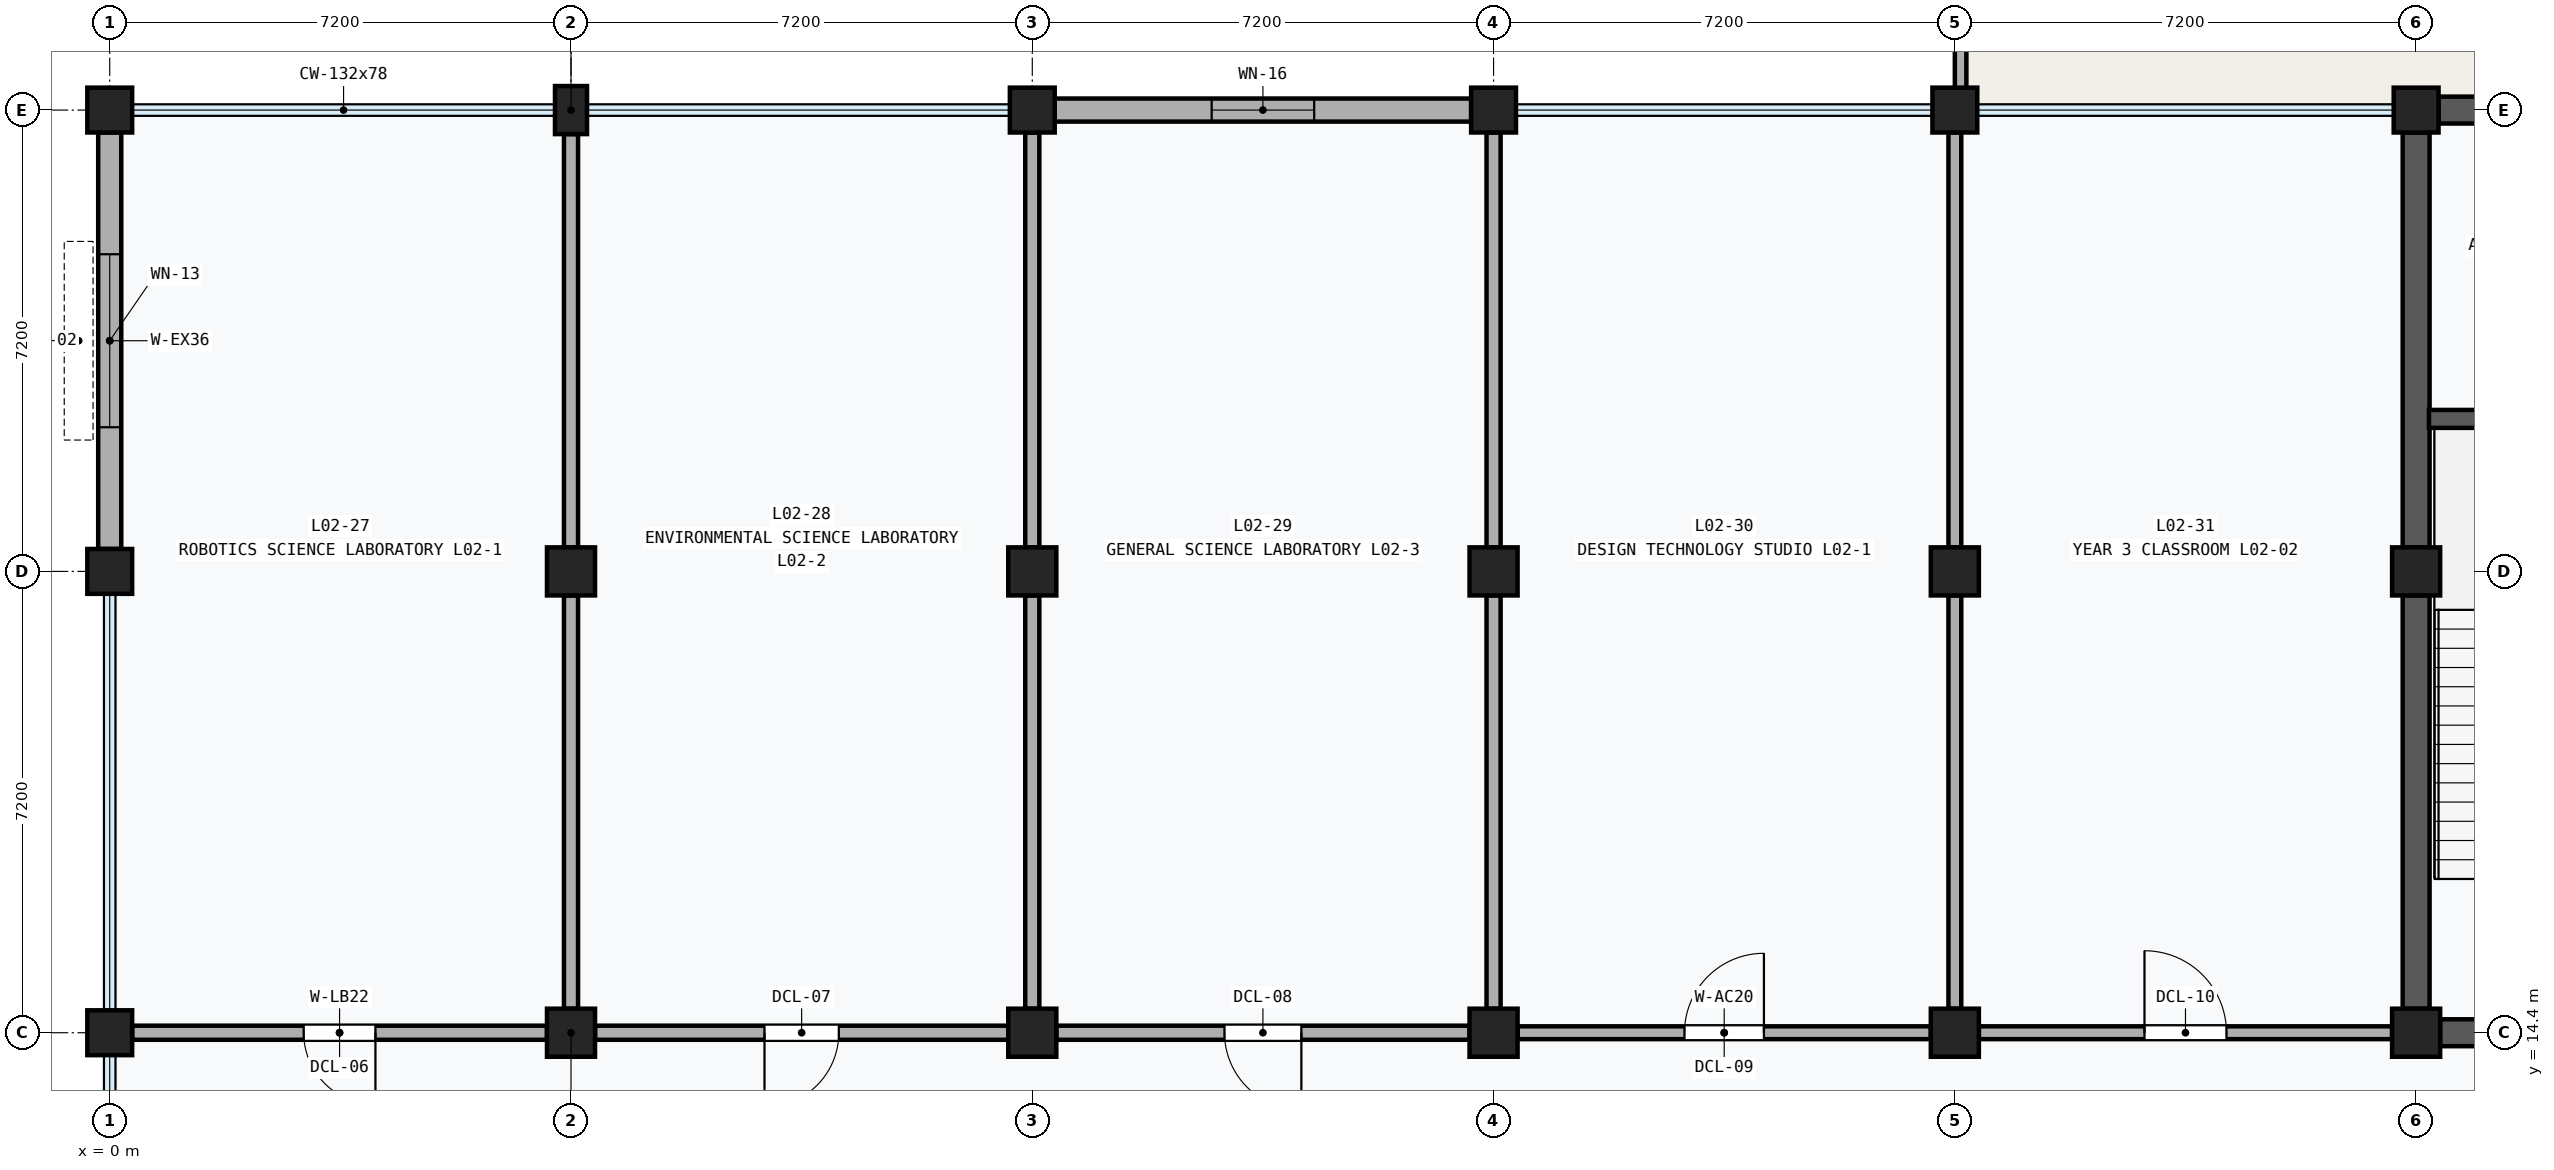
"""IFC4 building model, lengths in metres.
Left out: names, types, materials, properties, quantities, classifications, styles, units other than length and angle.
Written with IfcOpenShell. Run it as: python <this file> out.ifc"""

import sys

from ifc_helpers import new_model, si_unit, direction, frame, frame_2d, origin, origin_2d, place, context, subcontext, project, spatial, rectangle, extrude, element, fill, save


model = new_model("IFC4")
c1 = context("Model", 3, precision=1e-05, world=origin(), true_north=direction((0.0, 1.0)))
c2 = subcontext(c1, "Body", "Model", "MODEL_VIEW")
j1 = project(units=[si_unit("LENGTHUNIT", "METRE"), si_unit("PLANEANGLEUNIT", "RADIAN")], contexts=[c1])
p1 = place(None, origin())
s1 = spatial("IfcSite", under=j1, at=p1, CompositionType="ELEMENT")
p2 = place(p1, origin())
s2 = spatial("IfcBuilding", under=s1, at=p2, CompositionType="ELEMENT")
p3 = place(p2, frame((0.0, 0.0, 9.6)))
s3 = spatial("IfcBuildingStorey", under=s2, at=p3, CompositionType="ELEMENT", Elevation=9.6)
for number, where, z_axis, x_axis in (
    (1, (0.0, 14.4, 0.0), (0.0, 0.0, 1.0), (1.0, 0.0, 0.0)),
    (2, (0.0, 21.6, 0.0), (0.0, 0.0, 1.0), (1.0, 0.0, 0.0)),
    (3, (0.0, 28.8, 0.0), (0.0, 0.0, 1.0), (1.0, 0.0, 0.0)),
):
    element("IfcColumn", number, at=place(p3, frame(where, z_axis=z_axis, x_axis=x_axis)), inside=s3, PredefinedType="COLUMN", context=c2, shape_type="SweptSolid", body=[
        extrude(rectangle(XDim=0.7, YDim=0.7, at=origin_2d()), origin(), (0.0, 0.0, 1.0), 4.8),
    ])
for number, where, z_axis, x_axis in (
    (4, (7.2, 14.4, 0.0), (0.0, 0.0, 1.0), (1.0, 0.0, 0.0)),
    (5, (7.2, 21.6, 0.0), (0.0, 0.0, 1.0), (1.0, 0.0, 0.0)),
):
    element("IfcColumn", number, at=place(p3, frame(where, z_axis=z_axis, x_axis=x_axis)), inside=s3, PredefinedType="COLUMN", context=c2, shape_type="SweptSolid", body=[
        extrude(rectangle(XDim=0.75, YDim=0.75, at=origin_2d()), origin(), (0.0, 0.0, 1.0), 4.8),
    ])
p4 = place(p3, frame((7.2, 28.8, 0.0), z_axis=(0.0, 0.0, 1.0), x_axis=(1.0, 0.0, 0.0)))
e6 = element("IfcColumn", 6, at=p4, inside=s3, PredefinedType="PILASTER", context=c2, shape_type="SweptSolid", body=[
    extrude(rectangle(XDim=0.5, YDim=0.75, at=origin_2d()), origin(), (0.0, 0.0, 1.0), 4.8),
])
for number, where, z_axis, x_axis in (
    (7, (14.4, 14.4, 0.0), (0.0, 0.0, 1.0), (1.0, 0.0, 0.0)),
    (8, (14.4, 21.6, 0.0), (0.0, 0.0, 1.0), (1.0, 0.0, 0.0)),
):
    element("IfcColumn", number, at=place(p3, frame(where, z_axis=z_axis, x_axis=x_axis)), inside=s3, PredefinedType="COLUMN", context=c2, shape_type="SweptSolid", body=[
        extrude(rectangle(XDim=0.75, YDim=0.75, at=origin_2d()), origin(), (0.0, 0.0, 1.0), 4.8),
    ])
p5 = place(p3, frame((14.4, 28.8, 0.0), z_axis=(0.0, 0.0, 1.0), x_axis=(1.0, 0.0, 0.0)))
e9 = element("IfcColumn", 9, at=p5, inside=s3, PredefinedType="COLUMN", context=c2, shape_type="SweptSolid", body=[
    extrude(rectangle(XDim=0.7, YDim=0.7, at=origin_2d()), origin(), (0.0, 0.0, 1.0), 4.8),
])
for number, where, z_axis, x_axis in (
    (10, (21.6, 14.4, 0.0), (0.0, 0.0, 1.0), (1.0, 0.0, 0.0)),
    (11, (21.6, 21.6, 0.0), (0.0, 0.0, 1.0), (1.0, 0.0, 0.0)),
):
    element("IfcColumn", number, at=place(p3, frame(where, z_axis=z_axis, x_axis=x_axis)), inside=s3, PredefinedType="COLUMN", context=c2, shape_type="SweptSolid", body=[
        extrude(rectangle(XDim=0.75, YDim=0.75, at=origin_2d()), origin(), (0.0, 0.0, 1.0), 4.8),
    ])
p6 = place(p3, frame((21.6, 28.8, 0.0), z_axis=(0.0, 0.0, 1.0), x_axis=(1.0, 0.0, 0.0)))
e12 = element("IfcColumn", 12, at=p6, inside=s3, PredefinedType="COLUMN", context=c2, shape_type="SweptSolid", body=[
    extrude(rectangle(XDim=0.7, YDim=0.7, at=origin_2d()), origin(), (0.0, 0.0, 1.0), 4.8),
])
for number, where, z_axis, x_axis in (
    (13, (28.8, 14.4, 0.0), (0.0, 0.0, 1.0), (1.0, 0.0, 0.0)),
    (14, (28.8, 21.6, 0.0), (0.0, 0.0, 1.0), (1.0, 0.0, 0.0)),
):
    element("IfcColumn", number, at=place(p3, frame(where, z_axis=z_axis, x_axis=x_axis)), inside=s3, PredefinedType="COLUMN", context=c2, shape_type="SweptSolid", body=[
        extrude(rectangle(XDim=0.75, YDim=0.75, at=origin_2d()), origin(), (0.0, 0.0, 1.0), 4.8),
    ])
p7 = place(p3, frame((28.8, 28.8, 0.0), z_axis=(0.0, 0.0, 1.0), x_axis=(1.0, 0.0, 0.0)))
e15 = element("IfcColumn", 15, at=p7, inside=s3, PredefinedType="COLUMN", context=c2, shape_type="SweptSolid", body=[
    extrude(rectangle(XDim=0.7, YDim=0.7, at=origin_2d()), origin(), (0.0, 0.0, 1.0), 4.8),
])
for number, where, z_axis, x_axis in (
    (16, (36.0, 14.4, 0.0), (0.0, 0.0, 1.0), (1.0, 0.0, 0.0)),
    (17, (36.0, 21.6, 0.0), (0.0, 0.0, 1.0), (1.0, 0.0, 0.0)),
):
    element("IfcColumn", number, at=place(p3, frame(where, z_axis=z_axis, x_axis=x_axis)), inside=s3, PredefinedType="COLUMN", context=c2, shape_type="SweptSolid", body=[
        extrude(rectangle(XDim=0.75, YDim=0.75, at=origin_2d()), origin(), (0.0, 0.0, 1.0), 4.8),
    ])
p8 = place(p3, frame((36.0, 28.8, 0.0), z_axis=(0.0, 0.0, 1.0), x_axis=(1.0, 0.0, 0.0)))
e18 = element("IfcColumn", 18, at=p8, inside=s3, PredefinedType="COLUMN", context=c2, shape_type="SweptSolid", body=[
    extrude(rectangle(XDim=0.7, YDim=0.7, at=origin_2d()), origin(), (0.0, 0.0, 1.0), 4.8),
])
p9 = place(p3, frame((0.0, 21.95, 0.0), z_axis=(0.0, 0.0, 1.0), x_axis=(0.0, 1.0, 0.0)))
e19 = element("IfcWall", 19, at=p9, inside=s3, PredefinedType="SOLIDWALL", context=c2, shape_type="SweptSolid", body=[
    extrude(rectangle(XDim=6.5, YDim=0.36, at=frame_2d((3.25, 0.0))), origin(), (0.0, 0.0, 1.0), 3.88),
])
p10 = place(p9, frame((1.9, 0.0, 0.85)))
e20 = element("IfcOpeningElement", 20, at=p10, cuts=e19, PredefinedType="OPENING", context=c2, shape_type="SweptSolid", body=[
    extrude(rectangle(XDim=2.7, YDim=2.0, at=frame_2d((1.35, 1.0))), frame((0.0, 0.192, 0.0), z_axis=(0.0, -1.0, 0.0), x_axis=(1.0, 0.0, 0.0)), (0.0, 0.0, 1.0), 0.384),
])
p11 = place(p3, frame((14.75, 28.8, 0.0), z_axis=(0.0, 0.0, 1.0), x_axis=(1.0, 0.0, 0.0)))
e21 = element("IfcWall", 21, at=p11, inside=s3, PredefinedType="SOLIDWALL", context=c2, shape_type="SweptSolid", body=[
    extrude(rectangle(XDim=6.5, YDim=0.36, at=frame_2d((3.25, 0.0))), origin(), (0.0, 0.0, 1.0), 3.88),
])
p12 = place(p11, frame((2.45, 0.0, 1.1)))
e22 = element("IfcOpeningElement", 22, at=p12, cuts=e21, PredefinedType="OPENING", context=c2, shape_type="SweptSolid", body=[
    extrude(rectangle(XDim=1.6, YDim=1.5, at=frame_2d((0.8, 0.75))), frame((0.0, 0.192, 0.0), z_axis=(0.0, -1.0, 0.0), x_axis=(1.0, 0.0, 0.0)), (0.0, 0.0, 1.0), 0.384),
])
p13 = place(p3, frame((28.89, 28.89, 0.0), z_axis=(0.0, 0.0, 1.0), x_axis=(0.0, 1.0, 0.0)))
e23 = element("IfcWall", 23, at=p13, inside=s3, PredefinedType="PARAPET", context=c2, shape_type="SweptSolid", body=[
    extrude(rectangle(XDim=7.02, YDim=0.18, at=frame_2d((3.51, 0.0))), origin(), (0.0, 0.0, 1.0), 0.95),
])
p14 = place(p3, frame((36.0, 14.775, 0.0), z_axis=(0.0, 0.0, 1.0), x_axis=(0.0, 1.0, 0.0)))
e24 = element("IfcWall", 24, at=p14, inside=s3, PredefinedType="SHEAR", context=c2, shape_type="SweptSolid", body=[
    extrude(rectangle(XDim=6.45, YDim=0.42, at=frame_2d((3.225, 0.0))), origin(), (0.0, 0.0, 1.0), 3.74),
])
p15 = place(p3, frame((36.0, 21.975, 0.0), z_axis=(0.0, 0.0, 1.0), x_axis=(0.0, 1.0, 0.0)))
e25 = element("IfcWall", 25, at=p15, inside=s3, PredefinedType="SHEAR", context=c2, shape_type="SweptSolid", body=[
    extrude(rectangle(XDim=6.475, YDim=0.42, at=frame_2d((3.237, 0.0))), origin(), (0.0, 0.0, 1.0), 3.74),
])
p16 = place(p3, frame((36.375, 14.4, 0.0), z_axis=(0.0, 0.0, 1.0), x_axis=(1.0, 0.0, 0.0)))
e26 = element("IfcWall", 26, at=p16, inside=s3, PredefinedType="SHEAR", context=c2, shape_type="SweptSolid", body=[
    extrude(rectangle(XDim=6.45, YDim=0.42, at=frame_2d((3.225, 0.0))), origin(), (0.0, 0.0, 1.0), 3.74),
])
p17 = place(p16, frame((4.395, 0.0, 0.0)))
e27 = element("IfcOpeningElement", 27, at=p17, cuts=e26, PredefinedType="OPENING", context=c2, shape_type="SweptSolid", body=[
    extrude(rectangle(XDim=1.7, YDim=2.25, at=frame_2d((0.85, 1.125))), frame((0.0, 0.222, 0.0), z_axis=(0.0, -1.0, 0.0), x_axis=(1.0, 0.0, 0.0)), (0.0, 0.0, 1.0), 0.444),
])
p18 = place(p3, frame((36.35, 28.8, 0.0), z_axis=(0.0, 0.0, 1.0), x_axis=(1.0, 0.0, 0.0)))
e28 = element("IfcWall", 28, at=p18, inside=s3, PredefinedType="SHEAR", context=c2, shape_type="SweptSolid", body=[
    extrude(rectangle(XDim=6.6, YDim=0.42, at=frame_2d((3.3, 0.0))), origin(), (0.0, 0.0, 1.0), 3.88),
])
p19 = place(p3, frame((36.2, 23.98, 0.0), z_axis=(0.0, 0.0, 1.0), x_axis=(1.0, 0.0, 0.0)))
e29 = element("IfcWall", 29, at=p19, inside=s3, PredefinedType="SHEAR", context=c2, shape_type="SweptSolid", body=[
    extrude(rectangle(XDim=3.78, YDim=0.28, at=frame_2d((1.89, 0.0))), origin(), (0.0, 0.0, 1.0), 4.51),
])
p20 = place(p3, frame((0.35, 14.4, 0.0), z_axis=(0.0, 0.0, 1.0), x_axis=(1.0, 0.0, 0.0)))
e30 = element("IfcWall", 30, at=p20, inside=s3, PredefinedType="PARTITIONING", context=c2, shape_type="SweptSolid", body=[
    extrude(rectangle(XDim=6.475, YDim=0.22, at=frame_2d((3.237, 0.0))), origin(), (0.0, 0.0, 1.0), 3.74),
])
p21 = place(p20, frame((2.677, 0.0, 0.0)))
e31 = element("IfcOpeningElement", 31, at=p21, cuts=e30, PredefinedType="OPENING", context=c2, shape_type="SweptSolid", body=[
    extrude(rectangle(XDim=1.12, YDim=2.2, at=frame_2d((0.56, 1.1))), frame((0.0, 0.122, 0.0), z_axis=(0.0, -1.0, 0.0), x_axis=(1.0, 0.0, 0.0)), (0.0, 0.0, 1.0), 0.244),
])
p22 = place(p3, frame((7.2, 14.775, 0.0), z_axis=(0.0, 0.0, 1.0), x_axis=(0.0, 1.0, 0.0)))
e32 = element("IfcWall", 32, at=p22, inside=s3, PredefinedType="PARTITIONING", context=c2, shape_type="SweptSolid", body=[
    extrude(rectangle(XDim=6.45, YDim=0.22, at=frame_2d((3.225, 0.0))), origin(), (0.0, 0.0, 1.0), 3.74),
])
p23 = place(p3, frame((7.2, 21.975, 0.0), z_axis=(0.0, 0.0, 1.0), x_axis=(0.0, 1.0, 0.0)))
e33 = element("IfcWall", 33, at=p23, inside=s3, PredefinedType="PARTITIONING", context=c2, shape_type="SweptSolid", body=[
    extrude(rectangle(XDim=6.45, YDim=0.22, at=frame_2d((3.225, 0.0))), origin(), (0.0, 0.0, 1.0), 3.74),
])
p24 = place(p3, frame((7.575, 14.4, 0.0), z_axis=(0.0, 0.0, 1.0), x_axis=(1.0, 0.0, 0.0)))
e34 = element("IfcWall", 34, at=p24, inside=s3, PredefinedType="PARTITIONING", context=c2, shape_type="SweptSolid", body=[
    extrude(rectangle(XDim=6.45, YDim=0.22, at=frame_2d((3.225, 0.0))), origin(), (0.0, 0.0, 1.0), 3.74),
])
p25 = place(p24, frame((2.645, 0.0, 0.0)))
e35 = element("IfcOpeningElement", 35, at=p25, cuts=e34, PredefinedType="OPENING", context=c2, shape_type="SweptSolid", body=[
    extrude(rectangle(XDim=1.16, YDim=2.22, at=frame_2d((0.58, 1.11))), frame((0.0, 0.122, 0.0), z_axis=(0.0, -1.0, 0.0), x_axis=(1.0, 0.0, 0.0)), (0.0, 0.0, 1.0), 0.244),
])
p26 = place(p3, frame((14.4, 14.775, 0.0), z_axis=(0.0, 0.0, 1.0), x_axis=(0.0, 1.0, 0.0)))
e36 = element("IfcWall", 36, at=p26, inside=s3, PredefinedType="PARTITIONING", context=c2, shape_type="SweptSolid", body=[
    extrude(rectangle(XDim=6.45, YDim=0.22, at=frame_2d((3.225, 0.0))), origin(), (0.0, 0.0, 1.0), 3.74),
])
p27 = place(p3, frame((14.4, 21.975, 0.0), z_axis=(0.0, 0.0, 1.0), x_axis=(0.0, 1.0, 0.0)))
e37 = element("IfcWall", 37, at=p27, inside=s3, PredefinedType="PARTITIONING", context=c2, shape_type="SweptSolid", body=[
    extrude(rectangle(XDim=6.475, YDim=0.22, at=frame_2d((3.237, 0.0))), origin(), (0.0, 0.0, 1.0), 3.74),
])
p28 = place(p3, frame((14.775, 14.4, 0.0), z_axis=(0.0, 0.0, 1.0), x_axis=(1.0, 0.0, 0.0)))
e38 = element("IfcWall", 38, at=p28, inside=s3, PredefinedType="PARTITIONING", context=c2, shape_type="SweptSolid", body=[
    extrude(rectangle(XDim=6.45, YDim=0.22, at=frame_2d((3.225, 0.0))), origin(), (0.0, 0.0, 1.0), 3.81),
])
p29 = place(p28, frame((2.625, 0.0, 0.0)))
e39 = element("IfcOpeningElement", 39, at=p29, cuts=e38, PredefinedType="OPENING", context=c2, shape_type="SweptSolid", body=[
    extrude(rectangle(XDim=1.2, YDim=2.24, at=frame_2d((0.6, 1.12))), frame((0.0, 0.122, 0.0), z_axis=(0.0, -1.0, 0.0), x_axis=(1.0, 0.0, 0.0)), (0.0, 0.0, 1.0), 0.244),
])
p30 = place(p3, frame((21.6, 14.775, 0.0), z_axis=(0.0, 0.0, 1.0), x_axis=(0.0, 1.0, 0.0)))
e40 = element("IfcWall", 40, at=p30, inside=s3, PredefinedType="PARTITIONING", context=c2, shape_type="SweptSolid", body=[
    extrude(rectangle(XDim=6.45, YDim=0.22, at=frame_2d((3.225, 0.0))), origin(), (0.0, 0.0, 1.0), 3.74),
])
p31 = place(p3, frame((21.6, 21.975, 0.0), z_axis=(0.0, 0.0, 1.0), x_axis=(0.0, 1.0, 0.0)))
e41 = element("IfcWall", 41, at=p31, inside=s3, PredefinedType="PARTITIONING", context=c2, shape_type="SweptSolid", body=[
    extrude(rectangle(XDim=6.475, YDim=0.22, at=frame_2d((3.237, 0.0))), origin(), (0.0, 0.0, 1.0), 3.74),
])
p32 = place(p3, frame((21.975, 14.4, 0.0), z_axis=(0.0, 0.0, 1.0), x_axis=(1.0, 0.0, 0.0)))
e42 = element("IfcWall", 42, at=p32, inside=s3, PredefinedType="PARTITIONING", context=c2, shape_type="SweptSolid", body=[
    extrude(rectangle(XDim=6.45, YDim=0.2, at=frame_2d((3.225, 0.0))), origin(), (0.0, 0.0, 1.0), 3.74),
])
p33 = place(p32, frame((2.605, 0.0, 0.0)))
e43 = element("IfcOpeningElement", 43, at=p33, cuts=e42, PredefinedType="OPENING", context=c2, shape_type="SweptSolid", body=[
    extrude(rectangle(XDim=1.24, YDim=2.26, at=frame_2d((0.62, 1.13))), frame((0.0, 0.112, 0.0), z_axis=(0.0, -1.0, 0.0), x_axis=(1.0, 0.0, 0.0)), (0.0, 0.0, 1.0), 0.224),
])
p34 = place(p3, frame((28.8, 14.775, 0.0), z_axis=(0.0, 0.0, 1.0), x_axis=(0.0, 1.0, 0.0)))
e44 = element("IfcWall", 44, at=p34, inside=s3, PredefinedType="PARTITIONING", context=c2, shape_type="SweptSolid", body=[
    extrude(rectangle(XDim=6.45, YDim=0.2, at=frame_2d((3.225, 0.0))), origin(), (0.0, 0.0, 1.0), 3.74),
])
p35 = place(p3, frame((28.8, 21.975, 0.0), z_axis=(0.0, 0.0, 1.0), x_axis=(0.0, 1.0, 0.0)))
e45 = element("IfcWall", 45, at=p35, inside=s3, PredefinedType="PARTITIONING", context=c2, shape_type="SweptSolid", body=[
    extrude(rectangle(XDim=6.475, YDim=0.2, at=frame_2d((3.237, 0.0))), origin(), (0.0, 0.0, 1.0), 3.74),
])
p36 = place(p3, frame((29.175, 14.4, 0.0), z_axis=(0.0, 0.0, 1.0), x_axis=(1.0, 0.0, 0.0)))
e46 = element("IfcWall", 46, at=p36, inside=s3, PredefinedType="PARTITIONING", context=c2, shape_type="SweptSolid", body=[
    extrude(rectangle(XDim=6.45, YDim=0.2, at=frame_2d((3.225, 0.0))), origin(), (0.0, 0.0, 1.0), 3.74),
])
p37 = place(p36, frame((2.585, 0.0, 0.0)))
e47 = element("IfcOpeningElement", 47, at=p37, cuts=e46, PredefinedType="OPENING", context=c2, shape_type="SweptSolid", body=[
    extrude(rectangle(XDim=1.28, YDim=2.28, at=frame_2d((0.64, 1.14))), frame((0.0, 0.112, 0.0), z_axis=(0.0, -1.0, 0.0), x_axis=(1.0, 0.0, 0.0)), (0.0, 0.0, 1.0), 0.224),
])
p38 = place(p10, origin())
e48 = element("IfcWindow", 48, at=p38, inside=s3, PartitioningType="SINGLE_PANEL", PredefinedType="WINDOW", context=c2, shape_type="SweptSolid", body=[
    extrude(rectangle(XDim=2.7, YDim=2.0, at=frame_2d((1.35, 1.0))), frame((0.0, 0.03, 0.0), z_axis=(0.0, -1.0, 0.0), x_axis=(1.0, 0.0, 0.0)), (0.0, 0.0, 1.0), 0.06),
])
fill(e20, e48)
p39 = place(p12, origin())
e49 = element("IfcWindow", 49, at=p39, inside=s3, PartitioningType="SINGLE_PANEL", PredefinedType="WINDOW", context=c2, shape_type="SweptSolid", body=[
    extrude(rectangle(XDim=1.6, YDim=1.5, at=frame_2d((0.8, 0.75))), frame((0.0, 0.03, 0.0), z_axis=(0.0, -1.0, 0.0), x_axis=(1.0, 0.0, 0.0)), (0.0, 0.0, 1.0), 0.06),
])
fill(e22, e49)
p40 = place(p21, frame((1.12, 0.0, 0.0), z_axis=(0.0, 0.0, 1.0), x_axis=(-1.0, 0.0, 0.0)))
e50 = element("IfcDoor", 50, at=p40, inside=s3, OperationType="SINGLE_SWING_LEFT", PredefinedType="DOOR", context=c2, shape_type="SweptSolid", body=[
    extrude(rectangle(XDim=1.12, YDim=2.2, at=frame_2d((0.56, 1.1))), frame((0.0, 0.025, 0.0), z_axis=(0.0, -1.0, 0.0), x_axis=(1.0, 0.0, 0.0)), (0.0, 0.0, 1.0), 0.05),
])
fill(e31, e50)
p41 = place(p25, frame((1.16, 0.0, 0.0), z_axis=(0.0, 0.0, 1.0), x_axis=(-1.0, 0.0, 0.0)))
e51 = element("IfcDoor", 51, at=p41, inside=s3, OperationType="SINGLE_SWING_RIGHT", PredefinedType="DOOR", context=c2, shape_type="SweptSolid", body=[
    extrude(rectangle(XDim=1.16, YDim=2.22, at=frame_2d((0.58, 1.11))), frame((0.0, 0.025, 0.0), z_axis=(0.0, -1.0, 0.0), x_axis=(1.0, 0.0, 0.0)), (0.0, 0.0, 1.0), 0.05),
])
fill(e35, e51)
p42 = place(p29, frame((1.2, 0.0, 0.0), z_axis=(0.0, 0.0, 1.0), x_axis=(-1.0, 0.0, 0.0)))
e52 = element("IfcDoor", 52, at=p42, inside=s3, OperationType="SINGLE_SWING_LEFT", PredefinedType="DOOR", context=c2, shape_type="SweptSolid", body=[
    extrude(rectangle(XDim=1.2, YDim=2.24, at=frame_2d((0.6, 1.12))), frame((0.0, 0.025, 0.0), z_axis=(0.0, -1.0, 0.0), x_axis=(1.0, 0.0, 0.0)), (0.0, 0.0, 1.0), 0.05),
])
fill(e39, e52)
p43 = place(p33, origin())
e53 = element("IfcDoor", 53, at=p43, inside=s3, OperationType="SINGLE_SWING_RIGHT", PredefinedType="DOOR", context=c2, shape_type="SweptSolid", body=[
    extrude(rectangle(XDim=1.24, YDim=2.26, at=frame_2d((0.62, 1.13))), frame((0.0, 0.025, 0.0), z_axis=(0.0, -1.0, 0.0), x_axis=(1.0, 0.0, 0.0)), (0.0, 0.0, 1.0), 0.05),
])
fill(e43, e53)
p44 = place(p37, origin())
e54 = element("IfcDoor", 54, at=p44, inside=s3, OperationType="SINGLE_SWING_LEFT", PredefinedType="DOOR", context=c2, shape_type="SweptSolid", body=[
    extrude(rectangle(XDim=1.28, YDim=2.28, at=frame_2d((0.64, 1.14))), frame((0.0, 0.025, 0.0), z_axis=(0.0, -1.0, 0.0), x_axis=(1.0, 0.0, 0.0)), (0.0, 0.0, 1.0), 0.05),
])
fill(e47, e54)
save(model, sys.argv[1])
